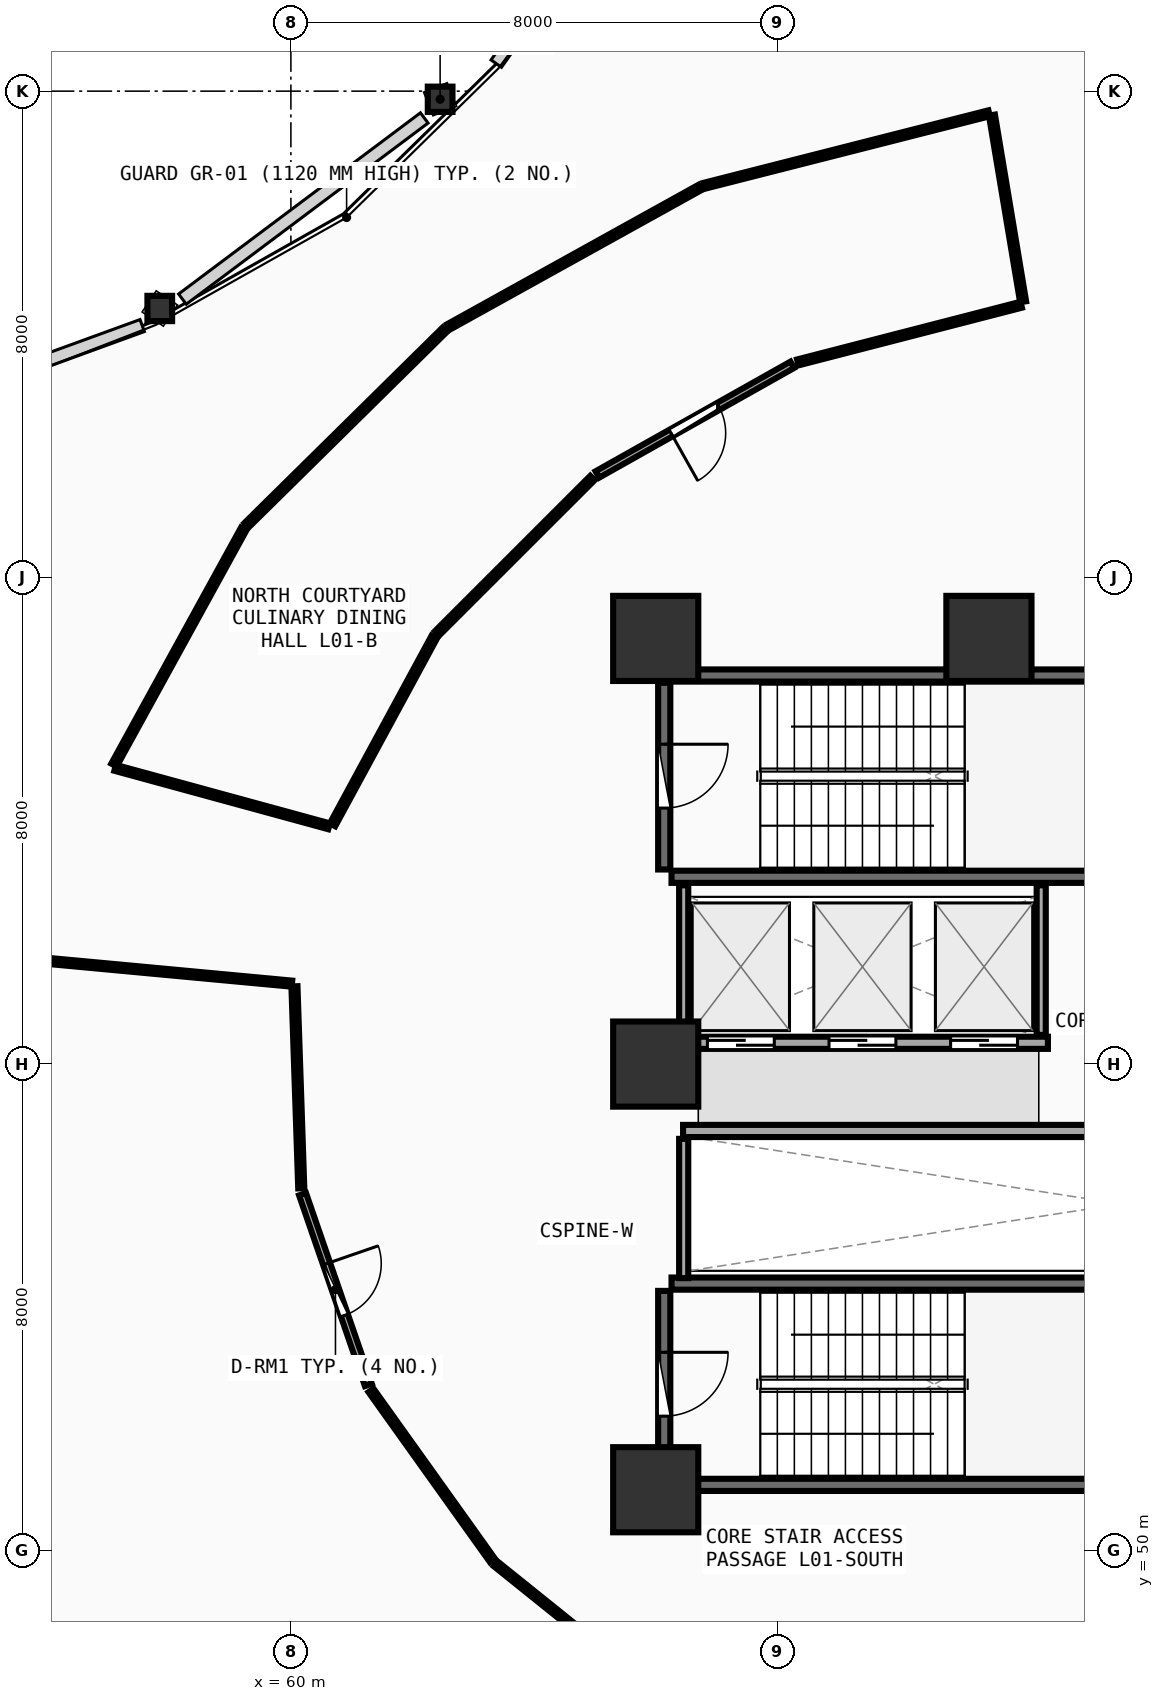
"""IFC4 building model, lengths in metres.
Left out: names, types, materials, properties, quantities, classifications, styles, units other than length and angle.
Written with IfcOpenShell. Run it as: python <this file> out.ifc"""

import sys

from ifc_helpers import new_model, si_unit, direction, frame, frame_2d, origin, origin_2d, place, context, subcontext, project, spatial, rectangle, i_section, extrude, element, fill, save


model = new_model("IFC4")
c1 = context("Model", 3, precision=1e-05, world=origin(), true_north=direction((0.0, 1.0)))
c2 = subcontext(c1, "Body", "Model", "MODEL_VIEW")
j1 = project(units=[si_unit("LENGTHUNIT", "METRE"), si_unit("PLANEANGLEUNIT", "RADIAN")], contexts=[c1])
p1 = place(None, origin())
s1 = spatial("IfcSite", under=j1, at=p1, CompositionType="ELEMENT")
p2 = place(p1, origin())
s2 = spatial("IfcBuilding", under=s1, at=p2, CompositionType="ELEMENT")
p3 = place(p2, frame((0.0, 0.0, 4.5)))
s3 = spatial("IfcBuildingStorey", under=s2, at=p3, CompositionType="ELEMENT", Elevation=4.5)
for number, where, z_axis, x_axis in (
    (1, (66.0, 51.0, 0.0), (0.0, 0.0, 1.0), (1.0, 0.0, 0.0)),
    (2, (71.48, 65.0, 0.0), (0.0, 0.0, 1.0), (1.0, 0.0, 0.0)),
    (3, (66.0, 65.0, 0.0), (0.0, 0.0, 1.0), (1.0, 0.0, 0.0)),
    (4, (66.0, 58.0, 0.0), (0.0, 0.0, 1.0), (1.0, 0.0, 0.0)),
):
    element("IfcColumn", number, at=place(p3, frame(where, z_axis=z_axis, x_axis=x_axis)), inside=s3, PredefinedType="PILASTER", context=c2, shape_type="SweptSolid", body=[
        extrude(rectangle(XDim=1.4, YDim=1.4, at=origin_2d()), origin(), (0.0, 0.0, 1.0), 4.5),
    ])
for number, where, z_axis, x_axis in (
    (5, (62.454, 73.866, 0.0), (0.0, 0.0, 1.0), (1.0, 0.0, 0.0)),
    (6, (57.844, 70.426, 0.0), (0.0, 0.0, 1.0), (1.0, 0.0, 0.0)),
):
    element("IfcColumn", number, at=place(p3, frame(where, z_axis=z_axis, x_axis=x_axis)), inside=s3, PredefinedType="COLUMN", context=c2, shape_type="SweptSolid", body=[
        extrude(i_section(OverallWidth=0.406, OverallDepth=0.416, WebThickness=0.029, FlangeThickness=0.048, FilletRadius=0.015, at=origin_2d()), origin(), (0.0, 0.0, 1.0), 4.5),
    ])
for number, where, z_axis, x_axis in (
    (7, (66.26, 61.08, 0.0), (0.0, 0.0, 1.0), (1.0, 0.0, 0.0)),
    (8, (73.42, 64.39, 0.0), (0.0, 0.0, 1.0), (-1.0, 0.0, 0.0)),
):
    element("IfcWall", number, at=place(p3, frame(where, z_axis=z_axis, x_axis=x_axis)), inside=s3, PredefinedType="SHEAR", context=c2, shape_type="SweptSolid", body=[
        extrude(rectangle(XDim=7.16, YDim=0.2, at=frame_2d((3.58, 0.0))), origin(), (0.0, 0.0, 1.0), 4.2),
    ])
p4 = place(p3, frame((66.14, 64.27, 0.0), z_axis=(0.0, 0.0, 1.0), x_axis=(0.0, -1.0, 0.0)))
e9 = element("IfcWall", 9, at=p4, inside=s3, PredefinedType="SHEAR", context=c2, shape_type="SweptSolid", body=[
    extrude(rectangle(XDim=3.07, YDim=0.2, at=frame_2d((1.535, 0.0))), origin(), (0.0, 0.0, 1.0), 4.2),
])
p5 = place(p4, frame((1.01, 0.0, 0.0)))
e10 = element("IfcOpeningElement", 10, at=p5, cuts=e9, PredefinedType="OPENING", context=c2, shape_type="SweptSolid", body=[
    extrude(rectangle(XDim=1.05, YDim=2.1, at=frame_2d((0.525, 1.05))), frame((0.0, 0.11, 0.0), z_axis=(0.0, -1.0, 0.0), x_axis=(1.0, 0.0, 0.0)), (0.0, 0.0, 1.0), 0.22),
])
for number, where, z_axis, x_axis in (
    (11, (66.26, 51.08, 0.0), (0.0, 0.0, 1.0), (1.0, 0.0, 0.0)),
    (12, (73.42, 54.39, 0.0), (0.0, 0.0, 1.0), (-1.0, 0.0, 0.0)),
):
    element("IfcWall", number, at=place(p3, frame(where, z_axis=z_axis, x_axis=x_axis)), inside=s3, PredefinedType="SHEAR", context=c2, shape_type="SweptSolid", body=[
        extrude(rectangle(XDim=7.16, YDim=0.2, at=frame_2d((3.58, 0.0))), origin(), (0.0, 0.0, 1.0), 4.2),
    ])
p6 = place(p3, frame((66.14, 54.27, 0.0), z_axis=(0.0, 0.0, 1.0), x_axis=(0.0, -1.0, 0.0)))
e13 = element("IfcWall", 13, at=p6, inside=s3, PredefinedType="SHEAR", context=c2, shape_type="SweptSolid", body=[
    extrude(rectangle(XDim=3.07, YDim=0.2, at=frame_2d((1.535, 0.0))), origin(), (0.0, 0.0, 1.0), 4.2),
])
p7 = place(p6, frame((1.01, 0.0, 0.0)))
e14 = element("IfcOpeningElement", 14, at=p7, cuts=e13, PredefinedType="OPENING", context=c2, shape_type="SweptSolid", body=[
    extrude(rectangle(XDim=1.05, YDim=2.1, at=frame_2d((0.525, 1.05))), frame((0.0, 0.11, 0.0), z_axis=(0.0, -1.0, 0.0), x_axis=(1.0, 0.0, 0.0)), (0.0, 0.0, 1.0), 0.22),
])
p8 = place(p3, frame((66.45, 58.35, 0.0), z_axis=(0.0, 0.0, 1.0), x_axis=(1.0, 0.0, 0.0)))
e15 = element("IfcWall", 15, at=p8, inside=s3, PredefinedType="SOLIDWALL", context=c2, shape_type="SweptSolid", body=[
    extrude(rectangle(XDim=6.0, YDim=0.2, at=frame_2d((3.0, 0.0))), origin(), (0.0, 0.0, 1.0), 4.19),
])
p9 = place(p8, frame((0.4, 0.0, 0.0)))
e16 = element("IfcOpeningElement", 16, at=p9, cuts=e15, PredefinedType="OPENING", context=c2, shape_type="SweptSolid", body=[
    extrude(rectangle(XDim=1.1, YDim=2.1, at=frame_2d((0.55, 1.05))), frame((0.0, 0.11, 0.0), z_axis=(0.0, -1.0, 0.0), x_axis=(1.0, 0.0, 0.0)), (0.0, 0.0, 1.0), 0.22),
])
p10 = place(p8, frame((2.4, 0.0, 0.0)))
e17 = element("IfcOpeningElement", 17, at=p10, cuts=e15, PredefinedType="OPENING", context=c2, shape_type="SweptSolid", body=[
    extrude(rectangle(XDim=1.1, YDim=2.1, at=frame_2d((0.55, 1.05))), frame((0.0, 0.11, 0.0), z_axis=(0.0, -1.0, 0.0), x_axis=(1.0, 0.0, 0.0)), (0.0, 0.0, 1.0), 0.22),
])
p11 = place(p8, frame((4.4, 0.0, 0.0)))
e18 = element("IfcOpeningElement", 18, at=p11, cuts=e15, PredefinedType="OPENING", context=c2, shape_type="SweptSolid", body=[
    extrude(rectangle(XDim=1.1, YDim=2.1, at=frame_2d((0.55, 1.05))), frame((0.0, 0.11, 0.0), z_axis=(0.0, -1.0, 0.0), x_axis=(1.0, 0.0, 0.0)), (0.0, 0.0, 1.0), 0.22),
])
for number, where, z_axis, x_axis in (
    (19, (66.46, 58.48, 0.0), (0.0, 0.0, 1.0), (0.0, 1.0, 0.0)),
    (20, (72.34, 58.48, 0.0), (0.0, 0.0, 1.0), (0.0, 1.0, 0.0)),
):
    element("IfcWall", number, at=place(p3, frame(where, z_axis=z_axis, x_axis=x_axis)), inside=s3, PredefinedType="PARTITIONING", context=c2, shape_type="SweptSolid", body=[
        extrude(rectangle(XDim=2.46, YDim=0.15, at=frame_2d((1.23, 0.0))), origin(), (0.0, 0.0, 1.0), 4.19),
    ])
p12 = place(p3, frame((66.45, 56.9, 0.0), z_axis=(0.0, 0.0, 1.0), x_axis=(1.0, 0.0, 0.0)))
e21 = element("IfcWall", 21, at=p12, inside=s3, PredefinedType="SOLIDWALL", context=c2, shape_type="SweptSolid", body=[
    extrude(rectangle(XDim=14.4, YDim=0.2, at=frame_2d((7.2, 0.0))), origin(), (0.0, 0.0, 1.0), 4.19),
])
p13 = place(p3, frame((66.46, 54.48, 0.0), z_axis=(0.0, 0.0, 1.0), x_axis=(0.0, 1.0, 0.0)))
e22 = element("IfcWall", 22, at=p13, inside=s3, PredefinedType="PARTITIONING", context=c2, shape_type="SweptSolid", body=[
    extrude(rectangle(XDim=2.29, YDim=0.15, at=frame_2d((1.145, 0.0))), origin(), (0.0, 0.0, 1.0), 4.19),
])
p14 = place(p3, frame((68.246, 69.5, 0.0), z_axis=(0.0, 0.0, 1.0), x_axis=(-0.871548943047, -0.490308514993, 0.0)))
e23 = element("IfcWall", 23, at=p14, inside=s3, PredefinedType="PARTITIONING", context=c2, shape_type="SweptSolid", body=[
    extrude(rectangle(XDim=3.678, YDim=0.12, at=frame_2d((1.839, 0.0))), origin(), (0.0, 0.0, 1.0), 3.585),
])
p15 = place(p14, frame((1.389, 0.0, 0.0)))
e24 = element("IfcOpeningElement", 24, at=p15, cuts=e23, PredefinedType="OPENING", context=c2, shape_type="SweptSolid", body=[
    extrude(rectangle(XDim=0.9, YDim=2.08, at=frame_2d((0.45, 1.04))), frame((0.0, 0.07, 0.0), z_axis=(0.0, -1.0, 0.0), x_axis=(1.0, 0.0, 0.0)), (0.0, 0.0, 1.0), 0.14),
])
p16 = place(p3, frame((60.192, 55.86, 0.0), z_axis=(0.0, 0.0, 1.0), x_axis=(0.326296764791, -0.945267380843, 0.0)))
e25 = element("IfcWall", 25, at=p16, inside=s3, PredefinedType="PARTITIONING", context=c2, shape_type="SweptSolid", body=[
    extrude(rectangle(XDim=3.318, YDim=0.12, at=frame_2d((1.659, 0.0))), origin(), (0.0, 0.0, 1.0), 4.19),
])
p17 = place(p16, frame((1.209, 0.0, 0.0)))
e26 = element("IfcOpeningElement", 26, at=p17, cuts=e25, PredefinedType="OPENING", context=c2, shape_type="SweptSolid", body=[
    extrude(rectangle(XDim=0.9, YDim=2.08, at=frame_2d((0.45, 1.04))), frame((0.0, 0.07, 0.0), z_axis=(0.0, -1.0, 0.0), x_axis=(1.0, 0.0, 0.0)), (0.0, 0.0, 1.0), 0.14),
])
p18 = place(p3, frame((72.01, 70.487, 0.0), z_axis=(0.0, 0.0, 1.0), x_axis=(-0.96827883043, -0.249872180405, 0.0)))
e27 = element("IfcWall", 27, at=p18, inside=s3, PredefinedType="PARTITIONING", context=c2, shape_type="SweptSolid", body=[
    extrude(rectangle(XDim=3.794, YDim=0.1, at=frame_2d((1.897, 0.0))), origin(), (0.0, 0.0, 1.0), 3.585),
])
p19 = place(p3, frame((64.96, 67.639, 0.0), z_axis=(0.0, 0.0, 1.0), x_axis=(-0.707241957398, -0.706971579129, 0.0)))
e28 = element("IfcWall", 28, at=p19, inside=s3, PredefinedType="PARTITIONING", context=c2, shape_type="SweptSolid", body=[
    extrude(rectangle(XDim=3.612, YDim=0.1, at=frame_2d((1.806, 0.0))), origin(), (0.0, 0.0, 1.0), 3.585),
])
p20 = place(p3, frame((62.358, 65.022, 0.0), z_axis=(0.0, 0.0, 1.0), x_axis=(-0.476511645664, -0.879168158856, 0.0)))
e29 = element("IfcWall", 29, at=p20, inside=s3, PredefinedType="PARTITIONING", context=c2, shape_type="SweptSolid", body=[
    extrude(rectangle(XDim=3.511, YDim=0.1, at=frame_2d((1.755, 0.0))), origin(), (0.0, 0.0, 1.0), 4.19),
])
p21 = place(p3, frame((60.627, 61.91, 0.0), z_axis=(0.0, 0.0, 1.0), x_axis=(-0.964640120238, 0.263570556831, 0.0)))
e30 = element("IfcWall", 30, at=p21, inside=s3, PredefinedType="PARTITIONING", context=c2, shape_type="SweptSolid", body=[
    extrude(rectangle(XDim=3.647, YDim=0.1, at=frame_2d((1.823, 0.0))), origin(), (0.0, 0.0, 1.0), 3.945),
])
p22 = place(p3, frame((57.09, 62.917, 0.0), z_axis=(0.0, 0.0, 1.0), x_axis=(0.481529459126, 0.876429905922, 0.0)))
e31 = element("IfcWall", 31, at=p22, inside=s3, PredefinedType="PARTITIONING", context=c2, shape_type="SweptSolid", body=[
    extrude(rectangle(XDim=4.43, YDim=0.1, at=frame_2d((2.215, 0.0))), origin(), (0.0, 0.0, 1.0), 3.585),
])
p23 = place(p3, frame((59.271, 66.863, 0.0), z_axis=(0.0, 0.0, 1.0), x_axis=(0.712024911857, 0.702154203075, 0.0)))
e32 = element("IfcWall", 32, at=p23, inside=s3, PredefinedType="PARTITIONING", context=c2, shape_type="SweptSolid", body=[
    extrude(rectangle(XDim=4.576, YDim=0.1, at=frame_2d((2.288, 0.0))), origin(), (0.0, 0.0, 1.0), 3.585),
])
p24 = place(p3, frame((62.593, 70.123, 0.0), z_axis=(0.0, 0.0, 1.0), x_axis=(0.874546970914, 0.484940816663, 0.0)))
e33 = element("IfcWall", 33, at=p24, inside=s3, PredefinedType="PARTITIONING", context=c2, shape_type="SweptSolid", body=[
    extrude(rectangle(XDim=4.725, YDim=0.1, at=frame_2d((2.362, 0.0))), origin(), (0.0, 0.0, 1.0), 3.585),
])
p25 = place(p3, frame((66.799, 72.444, 0.0), z_axis=(0.0, 0.0, 1.0), x_axis=(0.969121093941, 0.246585290069, 0.0)))
e34 = element("IfcWall", 34, at=p25, inside=s3, PredefinedType="PARTITIONING", context=c2, shape_type="SweptSolid", body=[
    extrude(rectangle(XDim=4.834, YDim=0.1, at=frame_2d((2.417, 0.0))), origin(), (0.0, 0.0, 1.0), 3.585),
])
p26 = place(p3, frame((71.53, 73.606, 0.0), z_axis=(0.0, 0.0, 1.0), x_axis=(0.164806022155, -0.98632599837, 0.0)))
e35 = element("IfcWall", 35, at=p26, inside=s3, PredefinedType="PARTITIONING", context=c2, shape_type="SweptSolid", body=[
    extrude(rectangle(XDim=3.112, YDim=0.1, at=frame_2d((1.556, 0.0))), origin(), (0.0, 0.0, 1.0), 3.945),
])
p27 = place(p3, frame((60.058, 59.279, 0.0), z_axis=(0.0, 0.0, 1.0), x_axis=(0.033786827999, -0.999429062142, 0.0)))
e36 = element("IfcWall", 36, at=p27, inside=s3, PredefinedType="PARTITIONING", context=c2, shape_type="SweptSolid", body=[
    extrude(rectangle(XDim=3.324, YDim=0.1, at=frame_2d((1.662, 0.0))), origin(), (0.0, 0.0, 1.0), 3.585),
])
p28 = place(p3, frame((61.317, 52.635, 0.0), z_axis=(0.0, 0.0, 1.0), x_axis=(0.581265057715, -0.813714281968, 0.0)))
e37 = element("IfcWall", 37, at=p28, inside=s3, PredefinedType="PARTITIONING", context=c2, shape_type="SweptSolid", body=[
    extrude(rectangle(XDim=3.439, YDim=0.1, at=frame_2d((1.719, 0.0))), origin(), (0.0, 0.0, 1.0), 3.585),
])
p29 = place(p3, frame((63.37, 49.779, 0.0), z_axis=(0.0, 0.0, 1.0), x_axis=(0.779622016763, -0.626250358067, 0.0)))
e38 = element("IfcWall", 38, at=p29, inside=s3, PredefinedType="PARTITIONING", context=c2, shape_type="SweptSolid", body=[
    extrude(rectangle(XDim=3.539, YDim=0.1, at=frame_2d((1.769, 0.0))), origin(), (0.0, 0.0, 1.0), 3.585),
])
p30 = place(p3, frame((48.68, 60.379, 0.0), z_axis=(0.0, 0.0, 1.0), x_axis=(0.995685013566, -0.092797380135, 0.0)))
e39 = element("IfcWall", 39, at=p30, inside=s3, PredefinedType="PARTITIONING", context=c2, shape_type="SweptSolid", body=[
    extrude(rectangle(XDim=11.386, YDim=0.1, at=frame_2d((5.693, 0.0))), origin(), (0.0, 0.0, 1.0), 3.885),
])
p31 = place(p5, origin())
e40 = element("IfcDoor", 40, at=p31, inside=s3, OperationType="SINGLE_SWING_LEFT", PredefinedType="DOOR", context=c2, shape_type="SweptSolid", body=[
    extrude(rectangle(XDim=1.05, YDim=2.1, at=frame_2d((0.525, 1.05))), frame((0.0, 0.025, 0.0), z_axis=(0.0, -1.0, 0.0), x_axis=(1.0, 0.0, 0.0)), (0.0, 0.0, 1.0), 0.05),
])
fill(e10, e40)
p32 = place(p7, origin())
e41 = element("IfcDoor", 41, at=p32, inside=s3, OperationType="SINGLE_SWING_LEFT", PredefinedType="DOOR", context=c2, shape_type="SweptSolid", body=[
    extrude(rectangle(XDim=1.05, YDim=2.1, at=frame_2d((0.525, 1.05))), frame((0.0, 0.025, 0.0), z_axis=(0.0, -1.0, 0.0), x_axis=(1.0, 0.0, 0.0)), (0.0, 0.0, 1.0), 0.05),
])
fill(e14, e41)
p33 = place(p9, origin())
e42 = element("IfcDoor", 42, at=p33, inside=s3, OperationType="DOUBLE_DOOR_SLIDING", PredefinedType="DOOR", context=c2, shape_type="SweptSolid", body=[
    extrude(rectangle(XDim=1.1, YDim=2.1, at=frame_2d((0.55, 1.05))), frame((0.0, 0.025, 0.0), z_axis=(0.0, -1.0, 0.0), x_axis=(1.0, 0.0, 0.0)), (0.0, 0.0, 1.0), 0.05),
])
fill(e16, e42)
p34 = place(p10, origin())
e43 = element("IfcDoor", 43, at=p34, inside=s3, OperationType="DOUBLE_DOOR_SLIDING", PredefinedType="DOOR", context=c2, shape_type="SweptSolid", body=[
    extrude(rectangle(XDim=1.1, YDim=2.1, at=frame_2d((0.55, 1.05))), frame((0.0, 0.025, 0.0), z_axis=(0.0, -1.0, 0.0), x_axis=(1.0, 0.0, 0.0)), (0.0, 0.0, 1.0), 0.05),
])
fill(e17, e43)
p35 = place(p11, origin())
e44 = element("IfcDoor", 44, at=p35, inside=s3, OperationType="DOUBLE_DOOR_SLIDING", PredefinedType="DOOR", context=c2, shape_type="SweptSolid", body=[
    extrude(rectangle(XDim=1.1, YDim=2.1, at=frame_2d((0.55, 1.05))), frame((0.0, 0.025, 0.0), z_axis=(0.0, -1.0, 0.0), x_axis=(1.0, 0.0, 0.0)), (0.0, 0.0, 1.0), 0.05),
])
fill(e18, e44)
p36 = place(p15, origin())
e45 = element("IfcDoor", 45, at=p36, inside=s3, OperationType="SINGLE_SWING_RIGHT", PredefinedType="DOOR", context=c2, shape_type="SweptSolid", body=[
    extrude(rectangle(XDim=0.9, YDim=2.08, at=frame_2d((0.45, 1.04))), frame((0.0, 0.025, 0.0), z_axis=(0.0, -1.0, 0.0), x_axis=(1.0, 0.0, 0.0)), (0.0, 0.0, 1.0), 0.05),
])
fill(e24, e45)
p37 = place(p17, origin())
e46 = element("IfcDoor", 46, at=p37, inside=s3, OperationType="SINGLE_SWING_LEFT", PredefinedType="DOOR", context=c2, shape_type="SweptSolid", body=[
    extrude(rectangle(XDim=0.9, YDim=2.08, at=frame_2d((0.45, 1.04))), frame((0.0, 0.025, 0.0), z_axis=(0.0, -1.0, 0.0), x_axis=(1.0, 0.0, 0.0)), (0.0, 0.0, 1.0), 0.05),
])
fill(e26, e46)
save(model, sys.argv[1])
